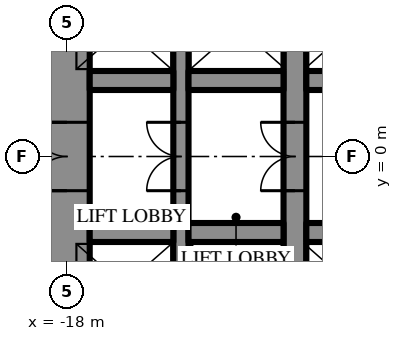
"""IFC4 building model, lengths in metres.
Left out: names, types, materials, properties, quantities, classifications, styles, units other than length and angle.
Written with IfcOpenShell. Run it as: python <this file> out.ifc"""

import sys

from ifc_helpers import new_model, si_unit, direction, frame, frame_2d, origin, place, context, subcontext, project, spatial, rectangle, extrude, element, fill, save


model = new_model("IFC4")
c1 = context("Model", 3, precision=1e-05, world=origin(), true_north=direction((0.0, 1.0)))
c2 = subcontext(c1, "Body", "Model", "MODEL_VIEW")
j1 = project(units=[si_unit("LENGTHUNIT", "METRE"), si_unit("PLANEANGLEUNIT", "RADIAN")], contexts=[c1])
p1 = place(None, origin())
s1 = spatial("IfcSite", under=j1, at=p1, CompositionType="ELEMENT")
p2 = place(p1, origin())
s2 = spatial("IfcBuilding", under=s1, at=p2, CompositionType="ELEMENT")
p3 = place(p2, frame((0.0, 0.0, 61.3)))
s3 = spatial("IfcBuildingStorey", under=s2, at=p3, CompositionType="ELEMENT", Elevation=61.3)
p4 = place(p3, frame((-18.0, 10.7, 0.0), z_axis=(0.0, 0.0, 1.0), x_axis=(0.0, -1.0, 0.0)))
e1 = element("IfcWall", 1, at=p4, inside=s3, PredefinedType="SHEAR", context=c2, shape_type="SweptSolid", body=[
    extrude(rectangle(XDim=21.4, YDim=1.2, at=frame_2d((10.7, 0.0))), origin(), (0.0, 0.0, 1.0), 4.2),
])
p5 = place(p4, frame((9.8, 0.0, 0.0)))
e2 = element("IfcOpeningElement", 2, at=p5, cuts=e1, PredefinedType="OPENING", context=c2, shape_type="SweptSolid", body=[
    extrude(rectangle(XDim=1.8, YDim=2.4, at=frame_2d((0.9, 1.2))), frame((0.0, 0.61, 0.0), z_axis=(0.0, -1.0, 0.0), x_axis=(1.0, 0.0, 0.0)), (0.0, 0.0, 1.0), 1.22),
])
p6 = place(p3, frame((-12.0, -10.7, 0.0), z_axis=(0.0, 0.0, 1.0), x_axis=(0.0, 1.0, 0.0)))
e3 = element("IfcWall", 3, at=p6, inside=s3, PredefinedType="SHEAR", context=c2, shape_type="SweptSolid", body=[
    extrude(rectangle(XDim=21.4, YDim=0.6, at=frame_2d((10.7, 0.0))), origin(), (0.0, 0.0, 1.0), 4.2),
])
p7 = place(p6, frame((9.8, 0.0, 0.0)))
e4 = element("IfcOpeningElement", 4, at=p7, cuts=e3, PredefinedType="OPENING", context=c2, shape_type="SweptSolid", body=[
    extrude(rectangle(XDim=1.8, YDim=2.4, at=frame_2d((0.9, 1.2))), frame((0.0, 0.31, 0.0), z_axis=(0.0, -1.0, 0.0), x_axis=(1.0, 0.0, 0.0)), (0.0, 0.0, 1.0), 0.62),
])
p8 = place(p3, frame((-15.0, -10.7, 0.0), z_axis=(0.0, 0.0, 1.0), x_axis=(0.0, 1.0, 0.0)))
e5 = element("IfcWall", 5, at=p8, inside=s3, PredefinedType="SHEAR", context=c2, shape_type="SweptSolid", body=[
    extrude(rectangle(XDim=21.4, YDim=0.4, at=frame_2d((10.7, 0.0))), origin(), (0.0, 0.0, 1.0), 4.2),
])
p9 = place(p8, frame((9.8, 0.0, 0.0)))
e6 = element("IfcOpeningElement", 6, at=p9, cuts=e5, PredefinedType="OPENING", context=c2, shape_type="SweptSolid", body=[
    extrude(rectangle(XDim=1.8, YDim=2.4, at=frame_2d((0.9, 1.2))), frame((0.0, 0.21, 0.0), z_axis=(0.0, -1.0, 0.0), x_axis=(1.0, 0.0, 0.0)), (0.0, 0.0, 1.0), 0.42),
])
p10 = place(p3, frame((-17.4, 2.0, 0.0), z_axis=(0.0, 0.0, 1.0), x_axis=(1.0, 0.0, 0.0)))
e7 = element("IfcWall", 7, at=p10, inside=s3, PredefinedType="SHEAR", context=c2, shape_type="SweptSolid", body=[
    extrude(rectangle(XDim=2.2, YDim=0.5, at=frame_2d((1.1, 0.0))), origin(), (0.0, 0.0, 1.0), 4.2),
])
p11 = place(p3, frame((-14.8, 2.0, 0.0), z_axis=(0.0, 0.0, 1.0), x_axis=(1.0, 0.0, 0.0)))
e8 = element("IfcWall", 8, at=p11, inside=s3, PredefinedType="SHEAR", context=c2, shape_type="SweptSolid", body=[
    extrude(rectangle(XDim=2.5, YDim=0.5, at=frame_2d((1.25, 0.0))), origin(), (0.0, 0.0, 1.0), 4.2),
])
p12 = place(p3, frame((-11.7, 2.0, 0.0), z_axis=(0.0, 0.0, 1.0), x_axis=(1.0, 0.0, 0.0)))
e9 = element("IfcWall", 9, at=p12, inside=s3, PredefinedType="SHEAR", context=c2, shape_type="SweptSolid", body=[
    extrude(rectangle(XDim=5.9, YDim=0.5, at=frame_2d((2.95, 0.0))), origin(), (0.0, 0.0, 1.0), 4.2),
])
p13 = place(p3, frame((3.2, -2.0, 0.0), z_axis=(0.0, 0.0, 1.0), x_axis=(-1.0, 0.0, 0.0)))
e10 = element("IfcWall", 10, at=p13, inside=s3, PredefinedType="SHEAR", context=c2, shape_type="SweptSolid", body=[
    extrude(rectangle(XDim=14.9, YDim=0.5, at=frame_2d((7.45, 0.0))), origin(), (0.0, 0.0, 1.0), 4.2),
])
p14 = place(p13, frame((1.15, 0.0, 0.0)))
e11 = element("IfcOpeningElement", 11, at=p14, cuts=e10, PredefinedType="OPENING", context=c2, shape_type="SweptSolid", body=[
    extrude(rectangle(XDim=1.1, YDim=2.2, at=frame_2d((0.55, 1.1))), frame((0.0, 0.26, 0.0), z_axis=(0.0, -1.0, 0.0), x_axis=(1.0, 0.0, 0.0)), (0.0, 0.0, 1.0), 0.52),
])
p15 = place(p13, frame((4.15, 0.0, 0.0)))
e12 = element("IfcOpeningElement", 12, at=p15, cuts=e10, PredefinedType="OPENING", context=c2, shape_type="SweptSolid", body=[
    extrude(rectangle(XDim=1.1, YDim=2.2, at=frame_2d((0.55, 1.1))), frame((0.0, 0.26, 0.0), z_axis=(0.0, -1.0, 0.0), x_axis=(1.0, 0.0, 0.0)), (0.0, 0.0, 1.0), 0.52),
])
p16 = place(p13, frame((7.15, 0.0, 0.0)))
e13 = element("IfcOpeningElement", 13, at=p16, cuts=e10, PredefinedType="OPENING", context=c2, shape_type="SweptSolid", body=[
    extrude(rectangle(XDim=1.1, YDim=2.2, at=frame_2d((0.55, 1.1))), frame((0.0, 0.26, 0.0), z_axis=(0.0, -1.0, 0.0), x_axis=(1.0, 0.0, 0.0)), (0.0, 0.0, 1.0), 0.52),
])
p17 = place(p13, frame((10.15, 0.0, 0.0)))
e14 = element("IfcOpeningElement", 14, at=p17, cuts=e10, PredefinedType="OPENING", context=c2, shape_type="SweptSolid", body=[
    extrude(rectangle(XDim=1.1, YDim=2.2, at=frame_2d((0.55, 1.1))), frame((0.0, 0.26, 0.0), z_axis=(0.0, -1.0, 0.0), x_axis=(1.0, 0.0, 0.0)), (0.0, 0.0, 1.0), 0.52),
])
p18 = place(p3, frame((-12.3, -2.0, 0.0), z_axis=(0.0, 0.0, 1.0), x_axis=(-1.0, 0.0, 0.0)))
e15 = element("IfcWall", 15, at=p18, inside=s3, PredefinedType="SHEAR", context=c2, shape_type="SweptSolid", body=[
    extrude(rectangle(XDim=2.5, YDim=0.5, at=frame_2d((1.25, 0.0))), origin(), (0.0, 0.0, 1.0), 4.2),
])
p19 = place(p3, frame((-15.2, -2.0, 0.0), z_axis=(0.0, 0.0, 1.0), x_axis=(-1.0, 0.0, 0.0)))
e16 = element("IfcWall", 16, at=p19, inside=s3, PredefinedType="SHEAR", context=c2, shape_type="SweptSolid", body=[
    extrude(rectangle(XDim=2.2, YDim=0.5, at=frame_2d((1.1, 0.0))), origin(), (0.0, 0.0, 1.0), 4.2),
])
p20 = place(p5, frame((1.8, 0.0, 0.0), z_axis=(0.0, 0.0, 1.0), x_axis=(-1.0, 0.0, 0.0)))
e17 = element("IfcDoor", 17, at=p20, inside=s3, OperationType="DOUBLE_DOOR_SINGLE_SWING", PredefinedType="DOOR", context=c2, shape_type="SweptSolid", body=[
    extrude(rectangle(XDim=1.8, YDim=2.4, at=frame_2d((0.9, 1.2))), frame((0.0, 0.025, 0.0), z_axis=(0.0, -1.0, 0.0), x_axis=(1.0, 0.0, 0.0)), (0.0, 0.0, 1.0), 0.05),
])
fill(e2, e17)
p21 = place(p7, origin())
e18 = element("IfcDoor", 18, at=p21, inside=s3, OperationType="DOUBLE_DOOR_SINGLE_SWING", PredefinedType="DOOR", context=c2, shape_type="SweptSolid", body=[
    extrude(rectangle(XDim=1.8, YDim=2.4, at=frame_2d((0.9, 1.2))), frame((0.0, 0.025, 0.0), z_axis=(0.0, -1.0, 0.0), x_axis=(1.0, 0.0, 0.0)), (0.0, 0.0, 1.0), 0.05),
])
fill(e4, e18)
p22 = place(p9, origin())
e19 = element("IfcDoor", 19, at=p22, inside=s3, OperationType="DOUBLE_DOOR_SINGLE_SWING", PredefinedType="DOOR", context=c2, shape_type="SweptSolid", body=[
    extrude(rectangle(XDim=1.8, YDim=2.4, at=frame_2d((0.9, 1.2))), frame((0.0, 0.025, 0.0), z_axis=(0.0, -1.0, 0.0), x_axis=(1.0, 0.0, 0.0)), (0.0, 0.0, 1.0), 0.05),
])
fill(e6, e19)
save(model, sys.argv[1])
